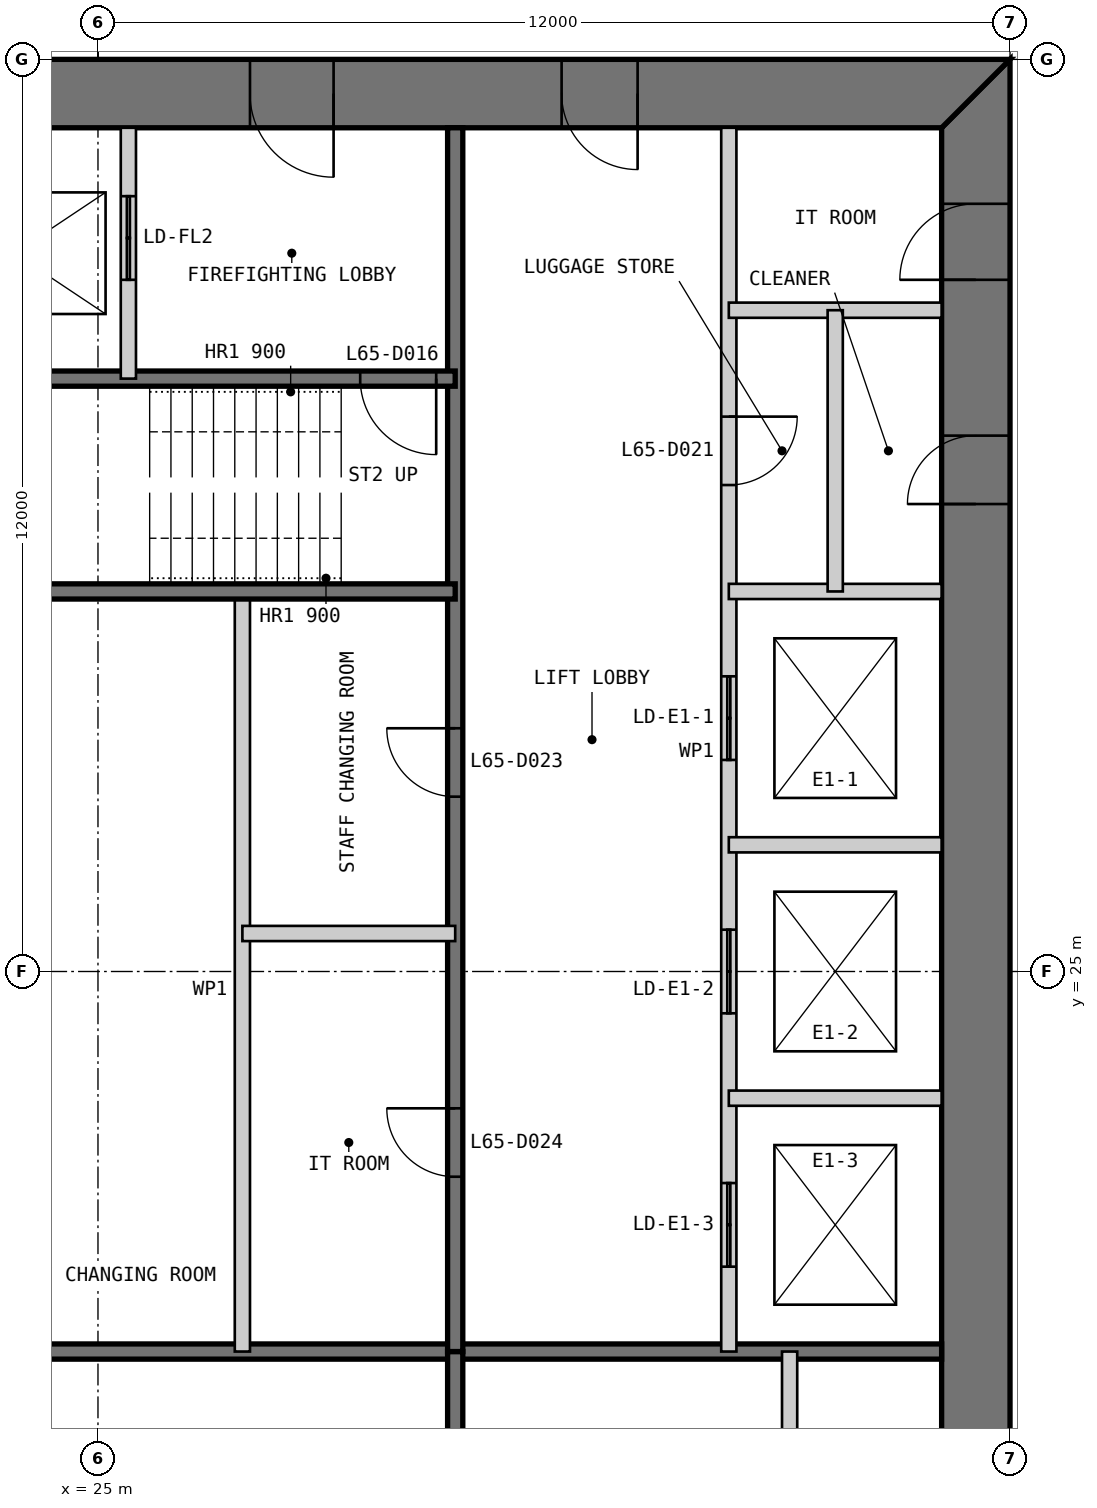
"""IFC4 building model, lengths in metres.
Left out: names, types, materials, properties, quantities, classifications, styles, units other than length and angle.
Written with IfcOpenShell. Run it as: python <this file> out.ifc"""

import sys

from ifc_helpers import new_model, si_unit, direction, frame, frame_2d, origin, place, context, subcontext, project, spatial, polyline, rectangle, outline, extrude, element, fill, save


model = new_model("IFC4")
c1 = context("Model", 3, precision=1e-05, world=origin(), true_north=direction((0.0, 1.0)))
c2 = subcontext(c1, "Body", "Model", "MODEL_VIEW")
j1 = project(units=[si_unit("LENGTHUNIT", "METRE"), si_unit("PLANEANGLEUNIT", "RADIAN")], contexts=[c1])
p1 = place(None, origin())
s1 = spatial("IfcSite", under=j1, at=p1, CompositionType="ELEMENT")
p2 = place(p1, origin())
s2 = spatial("IfcBuilding", under=s1, at=p2, CompositionType="ELEMENT")
p3 = place(p2, frame((0.0, 0.0, 273.0)))
s3 = spatial("IfcBuildingStorey", under=s2, at=p3, CompositionType="ELEMENT", Elevation=273.0)
p4 = place(p3, frame((36.55, 13.9, 0.0), z_axis=(0.0, 0.0, 1.0), x_axis=(0.0, 1.0, 0.0)))
e1 = element("IfcWall", 1, at=p4, inside=s3, PredefinedType="SHEAR", context=c2, shape_type="SweptSolid", body=[
    extrude(outline(polyline([(-0.9, -0.45), (23.1, -0.45), (22.2, 0.45), (0.0, 0.45), (-0.9, -0.45)])), origin(), (0.0, 0.0, 1.0), 3.4),
])
p5 = place(p4, frame((20.2, 0.0, 0.0)))
e2 = element("IfcOpeningElement", 2, at=p5, cuts=e1, PredefinedType="OPENING", context=c2, shape_type="SweptSolid", body=[
    extrude(rectangle(XDim=1.0, YDim=2.2, at=frame_2d((0.5, 1.1))), frame((0.0, 0.46, 0.0), z_axis=(0.0, -1.0, 0.0), x_axis=(1.0, 0.0, 0.0)), (0.0, 0.0, 1.0), 0.92),
])
p6 = place(p4, frame((17.25, 0.0, 0.0)))
e3 = element("IfcOpeningElement", 3, at=p6, cuts=e1, PredefinedType="OPENING", context=c2, shape_type="SweptSolid", body=[
    extrude(rectangle(XDim=0.9, YDim=2.2, at=frame_2d((0.45, 1.1))), frame((0.0, 0.46, 0.0), z_axis=(0.0, -1.0, 0.0), x_axis=(1.0, 0.0, 0.0)), (0.0, 0.0, 1.0), 0.92),
])
p7 = place(p3, frame((37.0, 36.55, 0.0), z_axis=(0.0, 0.0, 1.0), x_axis=(-1.0, 0.0, 0.0)))
e4 = element("IfcWall", 4, at=p7, inside=s3, PredefinedType="SHEAR", context=c2, shape_type="SweptSolid", body=[
    extrude(outline(polyline([(0.0, -0.45), (24.0, -0.45), (23.1, 0.45), (0.9, 0.45), (0.0, -0.45)])), origin(), (0.0, 0.0, 1.0), 3.4),
])
p8 = place(p7, frame((4.9, 0.0, 0.0)))
e5 = element("IfcOpeningElement", 5, at=p8, cuts=e4, PredefinedType="OPENING", context=c2, shape_type="SweptSolid", body=[
    extrude(rectangle(XDim=1.0, YDim=2.2, at=frame_2d((0.5, 1.1))), frame((0.0, 0.46, 0.0), z_axis=(0.0, -1.0, 0.0), x_axis=(1.0, 0.0, 0.0)), (0.0, 0.0, 1.0), 0.92),
])
p9 = place(p7, frame((8.9, 0.0, 0.0)))
e6 = element("IfcOpeningElement", 6, at=p9, cuts=e4, PredefinedType="OPENING", context=c2, shape_type="SweptSolid", body=[
    extrude(rectangle(XDim=1.1, YDim=2.2, at=frame_2d((0.55, 1.1))), frame((0.0, 0.46, 0.0), z_axis=(0.0, -1.0, 0.0), x_axis=(1.0, 0.0, 0.0)), (0.0, 0.0, 1.0), 0.92),
])
p10 = place(p7, frame((15.05, 0.0, 0.0)))
e7 = element("IfcOpeningElement", 7, at=p10, cuts=e4, PredefinedType="OPENING", context=c2, shape_type="SweptSolid", body=[
    extrude(rectangle(XDim=0.9, YDim=2.2, at=frame_2d((0.45, 1.1))), frame((0.0, 0.46, 0.0), z_axis=(0.0, -1.0, 0.0), x_axis=(1.0, 0.0, 0.0)), (0.0, 0.0, 1.0), 0.92),
])
p11 = place(p7, frame((17.9, 0.0, 0.0)))
e8 = element("IfcOpeningElement", 8, at=p11, cuts=e4, PredefinedType="OPENING", context=c2, shape_type="SweptSolid", body=[
    extrude(rectangle(XDim=1.0, YDim=2.2, at=frame_2d((0.5, 1.1))), frame((0.0, 0.46, 0.0), z_axis=(0.0, -1.0, 0.0), x_axis=(1.0, 0.0, 0.0)), (0.0, 0.0, 1.0), 0.92),
])
p12 = place(p7, frame((21.4, 0.0, 0.0)))
e9 = element("IfcOpeningElement", 9, at=p12, cuts=e4, PredefinedType="OPENING", context=c2, shape_type="SweptSolid", body=[
    extrude(rectangle(XDim=1.0, YDim=2.2, at=frame_2d((0.5, 1.1))), frame((0.0, 0.46, 0.0), z_axis=(0.0, -1.0, 0.0), x_axis=(1.0, 0.0, 0.0)), (0.0, 0.0, 1.0), 0.92),
])
p13 = place(p3, frame((20.3, 20.0, 0.0), z_axis=(0.0, 0.0, 1.0), x_axis=(1.0, 0.0, 0.0)))
e10 = element("IfcWall", 10, at=p13, inside=s3, PredefinedType="SOLIDWALL", context=c2, shape_type="SweptSolid", body=[
    extrude(rectangle(XDim=15.8, YDim=0.2, at=frame_2d((7.9, 0.0))), origin(), (0.0, 0.0, 1.0), 3.2),
])
p14 = place(p3, frame((29.7, 13.9, 0.0), z_axis=(0.0, 0.0, 1.0), x_axis=(0.0, 1.0, 0.0)))
e11 = element("IfcWall", 11, at=p14, inside=s3, PredefinedType="SOLIDWALL", context=c2, shape_type="SweptSolid", body=[
    extrude(rectangle(XDim=6.1, YDim=0.2, at=frame_2d((3.05, 0.0))), origin(), (0.0, 0.0, 1.0), 3.2),
])
p15 = place(p3, frame((34.1, 13.9, 0.0), z_axis=(0.0, 0.0, 1.0), x_axis=(0.0, 1.0, 0.0)))
e12 = element("IfcWall", 12, at=p15, inside=s3, PredefinedType="PARTITIONING", context=c2, shape_type="SweptSolid", body=[
    extrude(rectangle(XDim=6.1, YDim=0.2, at=frame_2d((3.05, 0.0))), origin(), (0.0, 0.0, 1.0), 3.2),
])
p16 = place(p3, frame((33.3, 36.1, 0.0), z_axis=(0.0, 0.0, 1.0), x_axis=(0.0, -1.0, 0.0)))
e13 = element("IfcWall", 13, at=p16, inside=s3, PredefinedType="PARTITIONING", context=c2, shape_type="SweptSolid", body=[
    extrude(rectangle(XDim=16.1, YDim=0.2, at=frame_2d((8.05, 0.0))), origin(), (0.0, 0.0, 1.0), 3.2),
])
p17 = place(p16, frame((3.8, 0.0, 0.0)))
e14 = element("IfcOpeningElement", 14, at=p17, cuts=e13, PredefinedType="OPENING", context=c2, shape_type="SweptSolid", body=[
    extrude(rectangle(XDim=0.9, YDim=2.2, at=frame_2d((0.45, 1.1))), frame((0.0, 0.11, 0.0), z_axis=(0.0, -1.0, 0.0), x_axis=(1.0, 0.0, 0.0)), (0.0, 0.0, 1.0), 0.22),
])
p18 = place(p16, frame((7.217, 0.0, 0.0)))
e15 = element("IfcOpeningElement", 15, at=p18, cuts=e13, PredefinedType="OPENING", context=c2, shape_type="SweptSolid", body=[
    extrude(rectangle(XDim=1.1, YDim=2.2, at=frame_2d((0.55, 1.1))), frame((0.0, 0.11, 0.0), z_axis=(0.0, -1.0, 0.0), x_axis=(1.0, 0.0, 0.0)), (0.0, 0.0, 1.0), 0.22),
])
p19 = place(p16, frame((10.55, 0.0, 0.0)))
e16 = element("IfcOpeningElement", 16, at=p19, cuts=e13, PredefinedType="OPENING", context=c2, shape_type="SweptSolid", body=[
    extrude(rectangle(XDim=1.1, YDim=2.2, at=frame_2d((0.55, 1.1))), frame((0.0, 0.11, 0.0), z_axis=(0.0, -1.0, 0.0), x_axis=(1.0, 0.0, 0.0)), (0.0, 0.0, 1.0), 0.22),
])
p20 = place(p16, frame((13.883, 0.0, 0.0)))
e17 = element("IfcOpeningElement", 17, at=p20, cuts=e13, PredefinedType="OPENING", context=c2, shape_type="SweptSolid", body=[
    extrude(rectangle(XDim=1.1, YDim=2.2, at=frame_2d((0.55, 1.1))), frame((0.0, 0.11, 0.0), z_axis=(0.0, -1.0, 0.0), x_axis=(1.0, 0.0, 0.0)), (0.0, 0.0, 1.0), 0.22),
])
p21 = place(p3, frame((29.7, 36.1, 0.0), z_axis=(0.0, 0.0, 1.0), x_axis=(0.0, -1.0, 0.0)))
e18 = element("IfcWall", 18, at=p21, inside=s3, PredefinedType="SOLIDWALL", context=c2, shape_type="SweptSolid", body=[
    extrude(rectangle(XDim=16.1, YDim=0.2, at=frame_2d((8.05, 0.0))), origin(), (0.0, 0.0, 1.0), 3.2),
])
p22 = place(p21, frame((7.9, 0.0, 0.0)))
e19 = element("IfcOpeningElement", 19, at=p22, cuts=e18, PredefinedType="OPENING", context=c2, shape_type="SweptSolid", body=[
    extrude(rectangle(XDim=0.9, YDim=2.2, at=frame_2d((0.45, 1.1))), frame((0.0, 0.11, 0.0), z_axis=(0.0, -1.0, 0.0), x_axis=(1.0, 0.0, 0.0)), (0.0, 0.0, 1.0), 0.22),
])
p23 = place(p21, frame((12.9, 0.0, 0.0)))
e20 = element("IfcOpeningElement", 20, at=p23, cuts=e18, PredefinedType="OPENING", context=c2, shape_type="SweptSolid", body=[
    extrude(rectangle(XDim=0.9, YDim=2.2, at=frame_2d((0.45, 1.1))), frame((0.0, 0.11, 0.0), z_axis=(0.0, -1.0, 0.0), x_axis=(1.0, 0.0, 0.0)), (0.0, 0.0, 1.0), 0.22),
])
for number, where, z_axis, x_axis in (
    (21, (36.1, 30.0, 0.0), (0.0, 0.0, 1.0), (-1.0, 0.0, 0.0)),
    (22, (36.1, 26.667, 0.0), (0.0, 0.0, 1.0), (-1.0, 0.0, 0.0)),
    (23, (36.1, 23.333, 0.0), (0.0, 0.0, 1.0), (-1.0, 0.0, 0.0)),
):
    element("IfcWall", number, at=place(p3, frame(where, z_axis=z_axis, x_axis=x_axis)), inside=s3, PredefinedType="PARTITIONING", context=c2, shape_type="SweptSolid", body=[
        extrude(rectangle(XDim=2.8, YDim=0.2, at=frame_2d((1.4, 0.0))), origin(), (0.0, 0.0, 1.0), 3.2),
    ])
p24 = place(p3, frame((26.9, 30.0, 0.0), z_axis=(0.0, 0.0, 1.0), x_axis=(0.0, -1.0, 0.0)))
e24 = element("IfcWall", 24, at=p24, inside=s3, PredefinedType="PARTITIONING", context=c2, shape_type="SweptSolid", body=[
    extrude(rectangle(XDim=10.0, YDim=0.2, at=frame_2d((5.0, 0.0))), origin(), (0.0, 0.0, 1.0), 3.2),
])
p25 = place(p3, frame((29.7, 32.8, 0.0), z_axis=(0.0, 0.0, 1.0), x_axis=(-1.0, 0.0, 0.0)))
e25 = element("IfcWall", 25, at=p25, inside=s3, PredefinedType="SOLIDWALL", context=c2, shape_type="SweptSolid", body=[
    extrude(rectangle(XDim=9.4, YDim=0.2, at=frame_2d((4.7, 0.0))), origin(), (0.0, 0.0, 1.0), 3.2),
])
p26 = place(p25, frame((0.25, 0.0, 0.0)))
e26 = element("IfcOpeningElement", 26, at=p26, cuts=e25, PredefinedType="OPENING", context=c2, shape_type="SweptSolid", body=[
    extrude(rectangle(XDim=1.0, YDim=2.2, at=frame_2d((0.5, 1.1))), frame((0.0, 0.11, 0.0), z_axis=(0.0, -1.0, 0.0), x_axis=(1.0, 0.0, 0.0)), (0.0, 0.0, 1.0), 0.22),
])
p27 = place(p3, frame((29.7, 30.0, 0.0), z_axis=(0.0, 0.0, 1.0), x_axis=(-1.0, 0.0, 0.0)))
e27 = element("IfcWall", 27, at=p27, inside=s3, PredefinedType="SOLIDWALL", context=c2, shape_type="SweptSolid", body=[
    extrude(rectangle(XDim=15.8, YDim=0.2, at=frame_2d((7.9, 0.0))), origin(), (0.0, 0.0, 1.0), 3.2),
])
p28 = place(p3, frame((25.4, 36.1, 0.0), z_axis=(0.0, 0.0, 1.0), x_axis=(0.0, -1.0, 0.0)))
e28 = element("IfcWall", 28, at=p28, inside=s3, PredefinedType="PARTITIONING", context=c2, shape_type="SweptSolid", body=[
    extrude(rectangle(XDim=3.3, YDim=0.2, at=frame_2d((1.65, 0.0))), origin(), (0.0, 0.0, 1.0), 3.2),
])
p29 = place(p28, frame((0.9, 0.0, 0.0)))
e29 = element("IfcOpeningElement", 29, at=p29, cuts=e28, PredefinedType="OPENING", context=c2, shape_type="SweptSolid", body=[
    extrude(rectangle(XDim=1.1, YDim=2.2, at=frame_2d((0.55, 1.1))), frame((0.0, 0.11, 0.0), z_axis=(0.0, -1.0, 0.0), x_axis=(1.0, 0.0, 0.0)), (0.0, 0.0, 1.0), 0.22),
])
p30 = place(p3, frame((36.1, 33.7, 0.0), z_axis=(0.0, 0.0, 1.0), x_axis=(-1.0, 0.0, 0.0)))
e30 = element("IfcWall", 30, at=p30, inside=s3, PredefinedType="PARTITIONING", context=c2, shape_type="SweptSolid", body=[
    extrude(rectangle(XDim=2.8, YDim=0.2, at=frame_2d((1.4, 0.0))), origin(), (0.0, 0.0, 1.0), 3.2),
])
p31 = place(p3, frame((34.7, 33.7, 0.0), z_axis=(0.0, 0.0, 1.0), x_axis=(0.0, -1.0, 0.0)))
e31 = element("IfcWall", 31, at=p31, inside=s3, PredefinedType="PARTITIONING", context=c2, shape_type="SweptSolid", body=[
    extrude(rectangle(XDim=3.7, YDim=0.2, at=frame_2d((1.85, 0.0))), origin(), (0.0, 0.0, 1.0), 3.2),
])
p32 = place(p3, frame((29.7, 25.5, 0.0), z_axis=(0.0, 0.0, 1.0), x_axis=(-1.0, 0.0, 0.0)))
e32 = element("IfcWall", 32, at=p32, inside=s3, PredefinedType="PARTITIONING", context=c2, shape_type="SweptSolid", body=[
    extrude(rectangle(XDim=2.8, YDim=0.2, at=frame_2d((1.4, 0.0))), origin(), (0.0, 0.0, 1.0), 3.2),
])
p33 = place(p8, origin())
e33 = element("IfcDoor", 33, at=p33, inside=s3, OperationType="SINGLE_SWING_LEFT", PredefinedType="DOOR", context=c2, shape_type="SweptSolid", body=[
    extrude(rectangle(XDim=1.0, YDim=2.2, at=frame_2d((0.5, 1.1))), frame((0.0, 0.025, 0.0), z_axis=(0.0, -1.0, 0.0), x_axis=(1.0, 0.0, 0.0)), (0.0, 0.0, 1.0), 0.05),
    extrude(outline(polyline([(0.0, 0.0), (0.04, 0.0), (0.04, 2.16), (0.96, 2.16), (0.96, 0.0), (1.0, 0.0), (1.0, 2.2), (0.0, 2.2), (0.0, 0.0)])), frame((0.0, 0.3, 0.0), z_axis=(0.0, -1.0, 0.0), x_axis=(1.0, 0.0, 0.0)), (0.0, 0.0, 1.0), 0.6),
])
fill(e5, e33)
p34 = place(p9, origin())
e34 = element("IfcDoor", 34, at=p34, inside=s3, OperationType="SINGLE_SWING_LEFT", PredefinedType="DOOR", context=c2, shape_type="SweptSolid", body=[
    extrude(rectangle(XDim=1.1, YDim=2.2, at=frame_2d((0.55, 1.1))), frame((0.0, 0.025, 0.0), z_axis=(0.0, -1.0, 0.0), x_axis=(1.0, 0.0, 0.0)), (0.0, 0.0, 1.0), 0.05),
    extrude(outline(polyline([(0.0, 0.0), (0.04, 0.0), (0.04, 2.16), (1.06, 2.16), (1.06, 0.0), (1.1, 0.0), (1.1, 2.2), (0.0, 2.2), (0.0, 0.0)])), frame((0.0, 0.3, 0.0), z_axis=(0.0, -1.0, 0.0), x_axis=(1.0, 0.0, 0.0)), (0.0, 0.0, 1.0), 0.6),
])
fill(e6, e34)
p35 = place(p26, origin())
e35 = element("IfcDoor", 35, at=p35, inside=s3, OperationType="SINGLE_SWING_LEFT", PredefinedType="DOOR", context=c2, shape_type="SweptSolid", body=[
    extrude(rectangle(XDim=1.0, YDim=2.2, at=frame_2d((0.5, 1.1))), frame((0.0, 0.025, 0.0), z_axis=(0.0, -1.0, 0.0), x_axis=(1.0, 0.0, 0.0)), (0.0, 0.0, 1.0), 0.05),
])
fill(e26, e35)
p36 = place(p5, origin())
e36 = element("IfcDoor", 36, at=p36, inside=s3, OperationType="SINGLE_SWING_LEFT", PredefinedType="DOOR", context=c2, shape_type="SweptSolid", body=[
    extrude(rectangle(XDim=1.0, YDim=2.2, at=frame_2d((0.5, 1.1))), frame((0.0, 0.025, 0.0), z_axis=(0.0, -1.0, 0.0), x_axis=(1.0, 0.0, 0.0)), (0.0, 0.0, 1.0), 0.05),
    extrude(outline(polyline([(0.0, 0.0), (0.04, 0.0), (0.04, 2.16), (0.96, 2.16), (0.96, 0.0), (1.0, 0.0), (1.0, 2.2), (0.0, 2.2), (0.0, 0.0)])), frame((0.0, 0.3, 0.0), z_axis=(0.0, -1.0, 0.0), x_axis=(1.0, 0.0, 0.0)), (0.0, 0.0, 1.0), 0.6),
])
fill(e2, e36)
p37 = place(p17, origin())
e37 = element("IfcDoor", 37, at=p37, inside=s3, OperationType="SINGLE_SWING_LEFT", PredefinedType="DOOR", context=c2, shape_type="SweptSolid", body=[
    extrude(rectangle(XDim=0.9, YDim=2.2, at=frame_2d((0.45, 1.1))), frame((0.0, 0.025, 0.0), z_axis=(0.0, -1.0, 0.0), x_axis=(1.0, 0.0, 0.0)), (0.0, 0.0, 1.0), 0.05),
])
fill(e14, e37)
p38 = place(p6, origin())
e38 = element("IfcDoor", 38, at=p38, inside=s3, OperationType="SINGLE_SWING_LEFT", PredefinedType="DOOR", context=c2, shape_type="SweptSolid", body=[
    extrude(rectangle(XDim=0.9, YDim=2.2, at=frame_2d((0.45, 1.1))), frame((0.0, 0.025, 0.0), z_axis=(0.0, -1.0, 0.0), x_axis=(1.0, 0.0, 0.0)), (0.0, 0.0, 1.0), 0.05),
    extrude(outline(polyline([(0.0, 0.0), (0.04, 0.0), (0.04, 2.16), (0.86, 2.16), (0.86, 0.0), (0.9, 0.0), (0.9, 2.2), (0.0, 2.2), (0.0, 0.0)])), frame((0.0, 0.3, 0.0), z_axis=(0.0, -1.0, 0.0), x_axis=(1.0, 0.0, 0.0)), (0.0, 0.0, 1.0), 0.6),
])
fill(e3, e38)
p39 = place(p22, frame((0.9, 0.0, 0.0), z_axis=(0.0, 0.0, 1.0), x_axis=(-1.0, 0.0, 0.0)))
e39 = element("IfcDoor", 39, at=p39, inside=s3, OperationType="SINGLE_SWING_RIGHT", PredefinedType="DOOR", context=c2, shape_type="SweptSolid", body=[
    extrude(rectangle(XDim=0.9, YDim=2.2, at=frame_2d((0.45, 1.1))), frame((0.0, 0.025, 0.0), z_axis=(0.0, -1.0, 0.0), x_axis=(1.0, 0.0, 0.0)), (0.0, 0.0, 1.0), 0.05),
])
fill(e19, e39)
p40 = place(p23, frame((0.9, 0.0, 0.0), z_axis=(0.0, 0.0, 1.0), x_axis=(-1.0, 0.0, 0.0)))
e40 = element("IfcDoor", 40, at=p40, inside=s3, OperationType="SINGLE_SWING_RIGHT", PredefinedType="DOOR", context=c2, shape_type="SweptSolid", body=[
    extrude(rectangle(XDim=0.9, YDim=2.2, at=frame_2d((0.45, 1.1))), frame((0.0, 0.025, 0.0), z_axis=(0.0, -1.0, 0.0), x_axis=(1.0, 0.0, 0.0)), (0.0, 0.0, 1.0), 0.05),
])
fill(e20, e40)
p41 = place(p29, origin())
e41 = element("IfcDoor", 41, at=p41, inside=s3, OperationType="DOUBLE_DOOR_SLIDING", PredefinedType="DOOR", context=c2, shape_type="SweptSolid", body=[
    extrude(rectangle(XDim=1.1, YDim=2.2, at=frame_2d((0.55, 1.1))), frame((0.0, 0.025, 0.0), z_axis=(0.0, -1.0, 0.0), x_axis=(1.0, 0.0, 0.0)), (0.0, 0.0, 1.0), 0.05),
])
fill(e29, e41)
p42 = place(p18, origin())
e42 = element("IfcDoor", 42, at=p42, inside=s3, OperationType="DOUBLE_DOOR_SLIDING", PredefinedType="DOOR", context=c2, shape_type="SweptSolid", body=[
    extrude(rectangle(XDim=1.1, YDim=2.2, at=frame_2d((0.55, 1.1))), frame((0.0, 0.025, 0.0), z_axis=(0.0, -1.0, 0.0), x_axis=(1.0, 0.0, 0.0)), (0.0, 0.0, 1.0), 0.05),
])
fill(e15, e42)
p43 = place(p19, origin())
e43 = element("IfcDoor", 43, at=p43, inside=s3, OperationType="DOUBLE_DOOR_SLIDING", PredefinedType="DOOR", context=c2, shape_type="SweptSolid", body=[
    extrude(rectangle(XDim=1.1, YDim=2.2, at=frame_2d((0.55, 1.1))), frame((0.0, 0.025, 0.0), z_axis=(0.0, -1.0, 0.0), x_axis=(1.0, 0.0, 0.0)), (0.0, 0.0, 1.0), 0.05),
])
fill(e16, e43)
p44 = place(p20, origin())
e44 = element("IfcDoor", 44, at=p44, inside=s3, OperationType="DOUBLE_DOOR_SLIDING", PredefinedType="DOOR", context=c2, shape_type="SweptSolid", body=[
    extrude(rectangle(XDim=1.1, YDim=2.2, at=frame_2d((0.55, 1.1))), frame((0.0, 0.025, 0.0), z_axis=(0.0, -1.0, 0.0), x_axis=(1.0, 0.0, 0.0)), (0.0, 0.0, 1.0), 0.05),
])
fill(e17, e44)
save(model, sys.argv[1])
